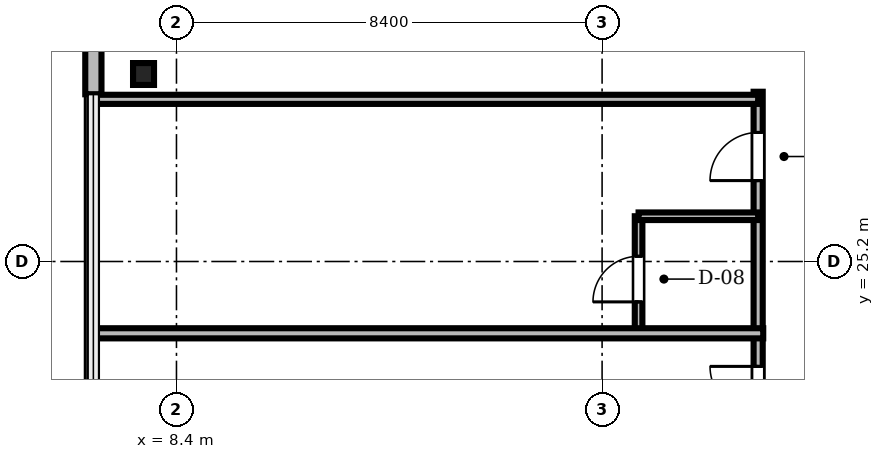
"""IFC4 building model, lengths in metres.
Left out: names, types, materials, properties, quantities, classifications, styles, units other than length and angle.
Written with IfcOpenShell. Run it as: python <this file> out.ifc"""

import sys

from ifc_helpers import new_model, si_unit, direction, frame, frame_2d, origin, origin_2d, place, context, subcontext, project, spatial, rectangle, i_section, extrude, source, transform, mapped, element, fill, save


model = new_model("IFC4")
c1 = context("Model", 3, precision=1e-05, world=origin(), true_north=direction((0.0, 1.0)))
c2 = subcontext(c1, "Body", "Model", "MODEL_VIEW")
j1 = project(units=[si_unit("LENGTHUNIT", "METRE"), si_unit("PLANEANGLEUNIT", "RADIAN")], contexts=[c1])
p1 = place(None, origin())
s1 = spatial("IfcSite", under=j1, at=p1, CompositionType="ELEMENT")
p2 = place(p1, origin())
s2 = spatial("IfcBuilding", under=s1, at=p2, CompositionType="ELEMENT")
p3 = place(p2, frame((0.0, 0.0, 144.6)))
s3 = spatial("IfcBuildingStorey", under=s2, at=p3, CompositionType="ELEMENT", Elevation=144.6)
m1 = source(origin(), c2, "Body", "SweptSolid", [
    extrude(i_section(OverallWidth=0.414, OverallDepth=0.432, WebThickness=0.026, FlangeThickness=0.04, FilletRadius=0.015, at=origin_2d()), origin(), (0.0, 0.0, 1.0), 3.46),
])
p4 = place(p3, frame((7.75, 28.9, 0.0), z_axis=(0.0, 0.0, 1.0), x_axis=(1.0, 0.0, 0.0)))
e1 = element("IfcColumn", 1, at=p4, inside=s3, PredefinedType="COLUMN", context=c2, shape_type="MappedRepresentation", body=[
    mapped(m1, transform((0.0, 0.0, 0.0), scale=1.0)),
])
m2 = source(origin(), c2, "Body", "SweptSolid", [
    extrude(rectangle(XDim=15.6, YDim=0.32, at=frame_2d((7.8, 0.0))), origin(), (0.0, 0.0, 1.0), 3.46),
])
p5 = place(p3, frame((6.76, 44.1, 0.0), z_axis=(0.0, 0.0, 1.0), x_axis=(0.0, -1.0, 0.0)))
e2 = element("IfcWall", 2, at=p5, inside=s3, PredefinedType="SOLIDWALL", context=c2, shape_type="MappedRepresentation", body=[
    mapped(m2, transform((0.0, 0.0, 0.0), scale=1.0)),
])
m3 = source(origin(), c2, "Body", "SweptSolid", [
    extrude(rectangle(XDim=2.2, YDim=2.4, at=frame_2d((1.1, 1.2))), frame((0.0, 0.17, 0.0), z_axis=(0.0, -1.0, 0.0), x_axis=(1.0, 0.0, 0.0)), (0.0, 0.0, 1.0), 0.34),
])
p6 = place(p5, frame((3.005, 0.0, 0.72)))
e3 = element("IfcOpeningElement", 3, at=p6, cuts=e2, PredefinedType="OPENING", context=c2, shape_type="MappedRepresentation", body=[
    mapped(m3, transform((0.0, 0.0, 0.0), scale=1.0)),
])
m4 = source(origin(), c2, "Body", "SweptSolid", [
    extrude(rectangle(XDim=14.0, YDim=0.18, at=frame_2d((7.0, 0.0))), origin(), (0.0, 0.0, 1.0), 2.852),
])
p7 = place(p3, frame((19.88, 14.55, 0.0), z_axis=(0.0, 0.0, 1.0), x_axis=(0.0, 1.0, 0.0)))
e4 = element("IfcWall", 4, at=p7, inside=s3, PredefinedType="PARTITIONING", context=c2, shape_type="MappedRepresentation", body=[
    mapped(m4, transform((0.0, 0.0, 0.0), scale=1.0)),
])
m5 = source(origin(), c2, "Body", "SweptSolid", [
    extrude(rectangle(XDim=1.05, YDim=2.2, at=frame_2d((0.525, 1.1))), frame((0.0, 0.1, 0.0), z_axis=(0.0, -1.0, 0.0), x_axis=(1.0, 0.0, 0.0)), (0.0, 0.0, 1.0), 0.2),
])
p8 = place(p7, frame((1.788, 0.0, 0.0)))
e5 = element("IfcOpeningElement", 5, at=p8, cuts=e4, PredefinedType="OPENING", context=c2, shape_type="MappedRepresentation", body=[
    mapped(m5, transform((0.0, 0.0, 0.0), scale=1.0)),
])
m6 = source(origin(), c2, "Body", "SweptSolid", [
    extrude(rectangle(XDim=0.95, YDim=2.15, at=frame_2d((0.475, 1.075))), frame((0.0, 0.1, 0.0), z_axis=(0.0, -1.0, 0.0), x_axis=(1.0, 0.0, 0.0)), (0.0, 0.0, 1.0), 0.2),
])
p9 = place(p7, frame((7.63, 0.0, 0.0)))
e6 = element("IfcOpeningElement", 6, at=p9, cuts=e4, PredefinedType="OPENING", context=c2, shape_type="MappedRepresentation", body=[
    mapped(m6, transform((0.0, 0.0, 0.0), scale=1.0)),
])
p10 = place(p7, frame((12.247, 0.0, 0.0)))
e7 = element("IfcOpeningElement", 7, at=p10, cuts=e4, PredefinedType="OPENING", context=c2, shape_type="MappedRepresentation", body=[
    mapped(m6, transform((0.0, 0.0, 0.0), scale=1.0)),
])
m7 = source(origin(), c2, "Body", "SweptSolid", [
    extrude(rectangle(XDim=2.29, YDim=0.15, at=frame_2d((1.145, 0.0))), origin(), (0.0, 0.0, 1.0), 3.46),
])
p11 = place(p3, frame((17.52, 23.803, 0.0), z_axis=(0.0, 0.0, 1.0), x_axis=(0.0, 1.0, 0.0)))
e8 = element("IfcWall", 8, at=p11, inside=s3, PredefinedType="PARTITIONING", context=c2, shape_type="MappedRepresentation", body=[
    mapped(m7, transform((0.0, 0.0, 0.0), scale=1.0)),
])
m8 = source(origin(), c2, "Body", "SweptSolid", [
    extrude(rectangle(XDim=0.9, YDim=2.1, at=frame_2d((0.45, 1.05))), frame((0.0, 0.085, 0.0), z_axis=(0.0, -1.0, 0.0), x_axis=(1.0, 0.0, 0.0)), (0.0, 0.0, 1.0), 0.17),
])
p12 = place(p11, frame((0.6, 0.0, 0.0)))
e9 = element("IfcOpeningElement", 9, at=p12, cuts=e8, PredefinedType="OPENING", context=c2, shape_type="MappedRepresentation", body=[
    mapped(m8, transform((0.0, 0.0, 0.0), scale=1.0)),
])
m9 = source(origin(), c2, "Body", "SweptSolid", [
    extrude(rectangle(XDim=13.25, YDim=0.2, at=frame_2d((6.625, 0.0))), origin(), (0.0, 0.0, 1.0), 2.702),
])
p13 = place(p3, frame((6.73, 23.783, 0.0), z_axis=(0.0, 0.0, 1.0), x_axis=(1.0, 0.0, 0.0)))
e10 = element("IfcWall", 10, at=p13, inside=s3, PredefinedType="PARTITIONING", context=c2, shape_type="MappedRepresentation", body=[
    mapped(m9, transform((0.0, 0.0, 0.0), scale=1.0)),
])
m10 = source(origin(), c2, "Body", "SweptSolid", [
    extrude(rectangle(XDim=13.15, YDim=0.18, at=frame_2d((6.575, 0.0))), origin(), (0.0, 0.0, 1.0), 2.702),
])
p14 = place(p3, frame((6.73, 28.4, 0.0), z_axis=(0.0, 0.0, 1.0), x_axis=(1.0, 0.0, 0.0)))
e11 = element("IfcWall", 11, at=p14, inside=s3, PredefinedType="PARTITIONING", context=c2, shape_type="MappedRepresentation", body=[
    mapped(m10, transform((0.0, 0.0, 0.0), scale=1.0)),
])
m11 = source(origin(), c2, "Body", "SweptSolid", [
    extrude(rectangle(XDim=2.36, YDim=0.15, at=frame_2d((1.18, 0.0))), origin(), (0.0, 0.0, 1.0), 3.46),
])
p15 = place(p3, frame((17.52, 26.093, 0.0), z_axis=(0.0, 0.0, 1.0), x_axis=(1.0, 0.0, 0.0)))
e12 = element("IfcWall", 12, at=p15, inside=s3, PredefinedType="PARTITIONING", context=c2, shape_type="MappedRepresentation", body=[
    mapped(m11, transform((0.0, 0.0, 0.0), scale=1.0)),
])
m12 = source(origin(), c2, "Body", "SweptSolid", [
    extrude(rectangle(XDim=0.95, YDim=2.15, at=frame_2d((0.475, 1.075))), frame((0.0, 0.025, 0.0), z_axis=(0.0, -1.0, 0.0), x_axis=(1.0, 0.0, 0.0)), (0.0, 0.0, 1.0), 0.05),
])
p16 = place(p9, origin())
e13 = element("IfcDoor", 13, at=p16, inside=s3, OperationType="SINGLE_SWING_RIGHT", PredefinedType="DOOR", context=c2, shape_type="MappedRepresentation", body=[
    mapped(m12, transform((0.0, 0.0, 0.0), scale=1.0)),
])
fill(e6, e13)
p17 = place(p10, origin())
e14 = element("IfcDoor", 14, at=p17, inside=s3, OperationType="SINGLE_SWING_LEFT", PredefinedType="DOOR", context=c2, shape_type="MappedRepresentation", body=[
    mapped(m12, transform((0.0, 0.0, 0.0), scale=1.0)),
])
fill(e7, e14)
m13 = source(origin(), c2, "Body", "SweptSolid", [
    extrude(rectangle(XDim=0.9, YDim=2.1, at=frame_2d((0.45, 1.05))), frame((0.0, 0.025, 0.0), z_axis=(0.0, -1.0, 0.0), x_axis=(1.0, 0.0, 0.0)), (0.0, 0.0, 1.0), 0.05),
])
p18 = place(p12, origin())
e15 = element("IfcDoor", 15, at=p18, inside=s3, OperationType="SINGLE_SWING_LEFT", PredefinedType="DOOR", context=c2, shape_type="MappedRepresentation", body=[
    mapped(m13, transform((0.0, 0.0, 0.0), scale=1.0)),
])
fill(e9, e15)
save(model, sys.argv[1])
